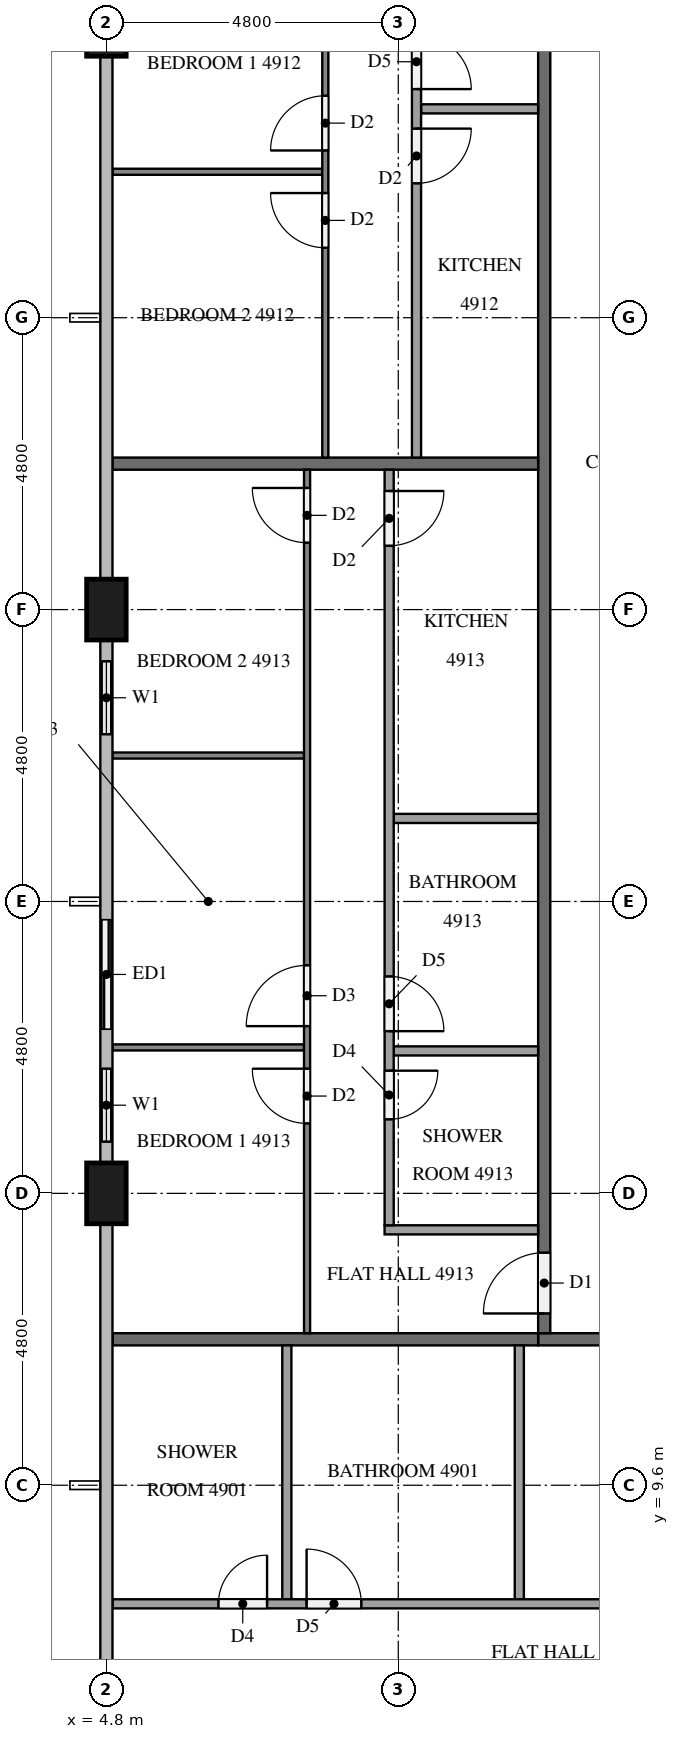
"""IFC4 building model, lengths in metres.
Left out: names, types, materials, properties, quantities, classifications, styles, units other than length and angle.
Written with IfcOpenShell. Run it as: python <this file> out.ifc"""

import sys

from ifc_helpers import new_model, si_unit, direction, frame, frame_2d, origin, origin_2d, place, context, subcontext, project, spatial, rectangle, extrude, element, fill, save


model = new_model("IFC4")
c1 = context("Model", 3, precision=1e-05, world=origin(), true_north=direction((0.0, 1.0)))
c2 = subcontext(c1, "Body", "Model", "MODEL_VIEW")
j1 = project(units=[si_unit("LENGTHUNIT", "METRE"), si_unit("PLANEANGLEUNIT", "RADIAN")], contexts=[c1])
p1 = place(None, origin())
s1 = spatial("IfcSite", under=j1, at=p1, CompositionType="ELEMENT")
p2 = place(p1, origin())
s2 = spatial("IfcBuilding", under=s1, at=p2, CompositionType="ELEMENT")
p3 = place(p2, frame((0.0, 0.0, 189.4)))
s3 = spatial("IfcBuildingStorey", under=s2, at=p3, CompositionType="ELEMENT", Elevation=189.4)
for number, where, z_axis, x_axis in (
    (1, (4.8, 33.6, 0.0), (0.0, 0.0, 1.0), (0.0, 1.0, 0.0)),
    (2, (4.8, 24.0, 0.0), (0.0, 0.0, 1.0), (0.0, 1.0, 0.0)),
    (3, (4.8, 14.4, 0.0), (0.0, 0.0, 1.0), (0.0, 1.0, 0.0)),
):
    element("IfcColumn", number, at=place(p3, frame(where, z_axis=z_axis, x_axis=x_axis)), inside=s3, PredefinedType="COLUMN", context=c2, shape_type="SweptSolid", body=[
        extrude(rectangle(XDim=1.0, YDim=0.65, at=origin_2d()), origin(), (0.0, 0.0, 1.0), 3.2),
    ])
p4 = place(p3, frame((4.8, 23.5, 0.0), z_axis=(0.0, 0.0, 1.0), x_axis=(0.0, -1.0, 0.0)))
e4 = element("IfcWall", 4, at=p4, inside=s3, PredefinedType="SOLIDWALL", context=c2, shape_type="SweptSolid", body=[
    extrude(rectangle(XDim=1.9, YDim=0.15, at=frame_2d((0.95, 0.0))), origin(), (0.0, 0.0, 1.0), 3.2),
])
p5 = place(p4, frame((0.35, 0.0, 0.9)))
e5 = element("IfcOpeningElement", 5, at=p5, cuts=e4, PredefinedType="OPENING", context=c2, shape_type="SweptSolid", body=[
    extrude(rectangle(XDim=1.2, YDim=1.4, at=frame_2d((0.6, 0.7))), frame((0.0, 0.085, 0.0), z_axis=(0.0, -1.0, 0.0), x_axis=(1.0, 0.0, 0.0)), (0.0, 0.0, 1.0), 0.17),
])
p6 = place(p3, frame((4.8, 19.2, 0.0), z_axis=(0.0, 0.0, 1.0), x_axis=(0.0, -1.0, 0.0)))
e6 = element("IfcWall", 6, at=p6, inside=s3, PredefinedType="SOLIDWALL", context=c2, shape_type="SweptSolid", body=[
    extrude(rectangle(XDim=4.3, YDim=0.15, at=frame_2d((2.15, 0.0))), origin(), (0.0, 0.0, 1.0), 3.2),
])
p7 = place(p6, frame((0.3, 0.0, 0.0)))
e7 = element("IfcOpeningElement", 7, at=p7, cuts=e6, PredefinedType="OPENING", context=c2, shape_type="SweptSolid", body=[
    extrude(rectangle(XDim=1.8, YDim=2.4, at=frame_2d((0.9, 1.2))), frame((0.0, 0.085, 0.0), z_axis=(0.0, -1.0, 0.0), x_axis=(1.0, 0.0, 0.0)), (0.0, 0.0, 1.0), 0.17),
])
p8 = place(p6, frame((2.75, 0.0, 0.9)))
e8 = element("IfcOpeningElement", 8, at=p8, cuts=e6, PredefinedType="OPENING", context=c2, shape_type="SweptSolid", body=[
    extrude(rectangle(XDim=1.2, YDim=1.4, at=frame_2d((0.6, 0.7))), frame((0.0, 0.085, 0.0), z_axis=(0.0, -1.0, 0.0), x_axis=(1.0, 0.0, 0.0)), (0.0, 0.0, 1.0), 0.17),
])
p9 = place(p3, frame((50.5, 12.0, 0.0), z_axis=(0.0, 0.0, 1.0), x_axis=(-1.0, 0.0, 0.0)))
e9 = element("IfcWall", 9, at=p9, inside=s3, PredefinedType="PARTITIONING", context=c2, shape_type="SweptSolid", body=[
    extrude(rectangle(XDim=38.6, YDim=0.2, at=frame_2d((19.3, 0.0))), origin(), (0.0, 0.0, 1.0), 3.2),
])
p10 = place(p9, frame((31.725, 0.0, 0.0)))
e10 = element("IfcOpeningElement", 10, at=p10, cuts=e9, PredefinedType="OPENING", context=c2, shape_type="SweptSolid", body=[
    extrude(rectangle(XDim=1.0, YDim=2.1, at=frame_2d((0.5, 1.05))), frame((0.0, 0.11, 0.0), z_axis=(0.0, -1.0, 0.0), x_axis=(1.0, 0.0, 0.0)), (0.0, 0.0, 1.0), 0.22),
])
p11 = place(p9, frame((19.725, 0.0, 0.0)))
e11 = element("IfcOpeningElement", 11, at=p11, cuts=e9, PredefinedType="OPENING", context=c2, shape_type="SweptSolid", body=[
    extrude(rectangle(XDim=1.0, YDim=2.1, at=frame_2d((0.5, 1.05))), frame((0.0, 0.11, 0.0), z_axis=(0.0, -1.0, 0.0), x_axis=(1.0, 0.0, 0.0)), (0.0, 0.0, 1.0), 0.22),
])
p12 = place(p9, frame((17.875, 0.0, 0.0)))
e12 = element("IfcOpeningElement", 12, at=p12, cuts=e9, PredefinedType="OPENING", context=c2, shape_type="SweptSolid", body=[
    extrude(rectangle(XDim=1.0, YDim=2.1, at=frame_2d((0.5, 1.05))), frame((0.0, 0.11, 0.0), z_axis=(0.0, -1.0, 0.0), x_axis=(1.0, 0.0, 0.0)), (0.0, 0.0, 1.0), 0.22),
])
p13 = place(p9, frame((3.475, 0.0, 0.0)))
e13 = element("IfcOpeningElement", 13, at=p13, cuts=e9, PredefinedType="OPENING", context=c2, shape_type="SweptSolid", body=[
    extrude(rectangle(XDim=1.0, YDim=2.1, at=frame_2d((0.5, 1.05))), frame((0.0, 0.11, 0.0), z_axis=(0.0, -1.0, 0.0), x_axis=(1.0, 0.0, 0.0)), (0.0, 0.0, 1.0), 0.22),
])
p14 = place(p3, frame((12.0, 12.1, 0.0), z_axis=(0.0, 0.0, 1.0), x_axis=(0.0, 1.0, 0.0)))
e14 = element("IfcWall", 14, at=p14, inside=s3, PredefinedType="PARTITIONING", context=c2, shape_type="SweptSolid", body=[
    extrude(rectangle(XDim=28.6, YDim=0.2, at=frame_2d((14.3, 0.0))), origin(), (0.0, 0.0, 1.0), 3.2),
])
p15 = place(p14, frame((27.275, 0.0, 0.0)))
e15 = element("IfcOpeningElement", 15, at=p15, cuts=e14, PredefinedType="OPENING", context=c2, shape_type="SweptSolid", body=[
    extrude(rectangle(XDim=1.0, YDim=2.1, at=frame_2d((0.5, 1.05))), frame((0.0, 0.11, 0.0), z_axis=(0.0, -1.0, 0.0), x_axis=(1.0, 0.0, 0.0)), (0.0, 0.0, 1.0), 0.22),
])
p16 = place(p14, frame((0.325, 0.0, 0.0)))
e16 = element("IfcOpeningElement", 16, at=p16, cuts=e14, PredefinedType="OPENING", context=c2, shape_type="SweptSolid", body=[
    extrude(rectangle(XDim=1.0, YDim=2.1, at=frame_2d((0.5, 1.05))), frame((0.0, 0.11, 0.0), z_axis=(0.0, -1.0, 0.0), x_axis=(1.0, 0.0, 0.0)), (0.0, 0.0, 1.0), 0.22),
])
for number, where, z_axis, x_axis in (
    (17, (4.9, 12.0, 0.0), (0.0, 0.0, 1.0), (1.0, 0.0, 0.0)),
    (18, (4.9, 26.4, 0.0), (0.0, 0.0, 1.0), (1.0, 0.0, 0.0)),
):
    element("IfcWall", number, at=place(p3, frame(where, z_axis=z_axis, x_axis=x_axis)), inside=s3, PredefinedType="PARTITIONING", context=c2, shape_type="SweptSolid", body=[
        extrude(rectangle(XDim=7.0, YDim=0.2, at=frame_2d((3.5, 0.0))), origin(), (0.0, 0.0, 1.0), 3.2),
    ])
for number, where, z_axis, x_axis in (
    (19, (11.59, 11.9, 0.0), (0.0, 0.0, 1.0), (0.0, -1.0, 0.0)),
    (20, (7.767, 11.9, 0.0), (0.0, 0.0, 1.0), (0.0, -1.0, 0.0)),
):
    element("IfcWall", number, at=place(p3, frame(where, z_axis=z_axis, x_axis=x_axis)), inside=s3, PredefinedType="PARTITIONING", context=c2, shape_type="SweptSolid", body=[
        extrude(rectangle(XDim=4.175, YDim=0.15, at=frame_2d((2.087, 0.0))), origin(), (0.0, 0.0, 1.0), 3.2),
    ])
p17 = place(p3, frame((4.9, 7.65, 0.0), z_axis=(0.0, 0.0, 1.0), x_axis=(1.0, 0.0, 0.0)))
e21 = element("IfcWall", 21, at=p17, inside=s3, PredefinedType="PARTITIONING", context=c2, shape_type="SweptSolid", body=[
    extrude(rectangle(XDim=12.425, YDim=0.15, at=frame_2d((6.212, 0.0))), origin(), (0.0, 0.0, 1.0), 3.2),
])
p18 = place(p17, frame((11.225, 0.0, 0.0)))
e22 = element("IfcOpeningElement", 22, at=p18, cuts=e21, PredefinedType="OPENING", context=c2, shape_type="SweptSolid", body=[
    extrude(rectangle(XDim=0.9, YDim=2.1, at=frame_2d((0.45, 1.05))), frame((0.0, 0.085, 0.0), z_axis=(0.0, -1.0, 0.0), x_axis=(1.0, 0.0, 0.0)), (0.0, 0.0, 1.0), 0.17),
])
p19 = place(p17, frame((3.192, 0.0, 0.0)))
e23 = element("IfcOpeningElement", 23, at=p19, cuts=e21, PredefinedType="OPENING", context=c2, shape_type="SweptSolid", body=[
    extrude(rectangle(XDim=0.9, YDim=2.1, at=frame_2d((0.45, 1.05))), frame((0.0, 0.085, 0.0), z_axis=(0.0, -1.0, 0.0), x_axis=(1.0, 0.0, 0.0)), (0.0, 0.0, 1.0), 0.17),
])
p20 = place(p17, frame((1.742, 0.0, 0.0)))
e24 = element("IfcOpeningElement", 24, at=p20, cuts=e21, PredefinedType="OPENING", context=c2, shape_type="SweptSolid", body=[
    extrude(rectangle(XDim=0.8, YDim=2.1, at=frame_2d((0.4, 1.05))), frame((0.0, 0.085, 0.0), z_axis=(0.0, -1.0, 0.0), x_axis=(1.0, 0.0, 0.0)), (0.0, 0.0, 1.0), 0.17),
])
p21 = place(p3, frame((8.35, 31.2, 0.0), z_axis=(0.0, 0.0, 1.0), x_axis=(-1.0, 0.0, 0.0)))
e25 = element("IfcWall", 25, at=p21, inside=s3, PredefinedType="PARTITIONING", context=c2, shape_type="SweptSolid", body=[
    extrude(rectangle(XDim=3.45, YDim=0.1, at=frame_2d((1.725, 0.0))), origin(), (0.0, 0.0, 1.0), 3.2),
])
p22 = place(p3, frame((8.4, 26.5, 0.0), z_axis=(0.0, 0.0, 1.0), x_axis=(0.0, 1.0, 0.0)))
e26 = element("IfcWall", 26, at=p22, inside=s3, PredefinedType="PARTITIONING", context=c2, shape_type="SweptSolid", body=[
    extrude(rectangle(XDim=14.2, YDim=0.1, at=frame_2d((7.1, 0.0))), origin(), (0.0, 0.0, 1.0), 3.2),
])
p23 = place(p22, frame((12.9, 0.0, 0.0)))
e27 = element("IfcOpeningElement", 27, at=p23, cuts=e26, PredefinedType="OPENING", context=c2, shape_type="SweptSolid", body=[
    extrude(rectangle(XDim=1.0, YDim=2.1, at=frame_2d((0.5, 1.05))), frame((0.0, 0.06, 0.0), z_axis=(0.0, -1.0, 0.0), x_axis=(1.0, 0.0, 0.0)), (0.0, 0.0, 1.0), 0.12),
])
p24 = place(p22, frame((5.05, 0.0, 0.0)))
e28 = element("IfcOpeningElement", 28, at=p24, cuts=e26, PredefinedType="OPENING", context=c2, shape_type="SweptSolid", body=[
    extrude(rectangle(XDim=0.9, YDim=2.1, at=frame_2d((0.45, 1.05))), frame((0.0, 0.06, 0.0), z_axis=(0.0, -1.0, 0.0), x_axis=(1.0, 0.0, 0.0)), (0.0, 0.0, 1.0), 0.12),
])
p25 = place(p22, frame((3.45, 0.0, 0.0)))
e29 = element("IfcOpeningElement", 29, at=p25, cuts=e26, PredefinedType="OPENING", context=c2, shape_type="SweptSolid", body=[
    extrude(rectangle(XDim=0.9, YDim=2.1, at=frame_2d((0.45, 1.05))), frame((0.0, 0.06, 0.0), z_axis=(0.0, -1.0, 0.0), x_axis=(1.0, 0.0, 0.0)), (0.0, 0.0, 1.0), 0.12),
])
p26 = place(p3, frame((11.9, 32.235, 0.0), z_axis=(0.0, 0.0, 1.0), x_axis=(-1.0, 0.0, 0.0)))
e30 = element("IfcWall", 30, at=p26, inside=s3, PredefinedType="PARTITIONING", context=c2, shape_type="SweptSolid", body=[
    extrude(rectangle(XDim=1.925, YDim=0.15, at=frame_2d((0.962, 0.0))), origin(), (0.0, 0.0, 1.0), 3.2),
])
p27 = place(p3, frame((9.9, 38.925, 0.0), z_axis=(0.0, 0.0, 1.0), x_axis=(0.0, -1.0, 0.0)))
e31 = element("IfcWall", 31, at=p27, inside=s3, PredefinedType="PARTITIONING", context=c2, shape_type="SweptSolid", body=[
    extrude(rectangle(XDim=12.425, YDim=0.15, at=frame_2d((6.212, 0.0))), origin(), (0.0, 0.0, 1.0), 3.2),
])
p28 = place(p27, frame((0.3, 0.0, 0.0)))
e32 = element("IfcOpeningElement", 32, at=p28, cuts=e31, PredefinedType="OPENING", context=c2, shape_type="SweptSolid", body=[
    extrude(rectangle(XDim=0.8, YDim=2.1, at=frame_2d((0.4, 1.05))), frame((0.0, 0.085, 0.0), z_axis=(0.0, -1.0, 0.0), x_axis=(1.0, 0.0, 0.0)), (0.0, 0.0, 1.0), 0.17),
])
p29 = place(p27, frame((5.465, 0.0, 0.0)))
e33 = element("IfcOpeningElement", 33, at=p29, cuts=e31, PredefinedType="OPENING", context=c2, shape_type="SweptSolid", body=[
    extrude(rectangle(XDim=0.9, YDim=2.1, at=frame_2d((0.45, 1.05))), frame((0.0, 0.085, 0.0), z_axis=(0.0, -1.0, 0.0), x_axis=(1.0, 0.0, 0.0)), (0.0, 0.0, 1.0), 0.17),
])
p30 = place(p27, frame((7.015, 0.0, 0.0)))
e34 = element("IfcOpeningElement", 34, at=p30, cuts=e31, PredefinedType="OPENING", context=c2, shape_type="SweptSolid", body=[
    extrude(rectangle(XDim=0.9, YDim=2.1, at=frame_2d((0.45, 1.05))), frame((0.0, 0.085, 0.0), z_axis=(0.0, -1.0, 0.0), x_axis=(1.0, 0.0, 0.0)), (0.0, 0.0, 1.0), 0.17),
])
for number, where, z_axis, x_axis in (
    (35, (8.05, 16.8, 0.0), (0.0, 0.0, 1.0), (-1.0, 0.0, 0.0)),
    (36, (8.05, 21.6, 0.0), (0.0, 0.0, 1.0), (-1.0, 0.0, 0.0)),
):
    element("IfcWall", number, at=place(p3, frame(where, z_axis=z_axis, x_axis=x_axis)), inside=s3, PredefinedType="PARTITIONING", context=c2, shape_type="SweptSolid", body=[
        extrude(rectangle(XDim=3.15, YDim=0.1, at=frame_2d((1.575, 0.0))), origin(), (0.0, 0.0, 1.0), 3.2),
    ])
p31 = place(p3, frame((8.1, 12.1, 0.0), z_axis=(0.0, 0.0, 1.0), x_axis=(0.0, 1.0, 0.0)))
e37 = element("IfcWall", 37, at=p31, inside=s3, PredefinedType="PARTITIONING", context=c2, shape_type="SweptSolid", body=[
    extrude(rectangle(XDim=14.2, YDim=0.1, at=frame_2d((7.1, 0.0))), origin(), (0.0, 0.0, 1.0), 3.2),
])
p32 = place(p31, frame((3.45, 0.0, 0.0)))
e38 = element("IfcOpeningElement", 38, at=p32, cuts=e37, PredefinedType="OPENING", context=c2, shape_type="SweptSolid", body=[
    extrude(rectangle(XDim=0.9, YDim=2.1, at=frame_2d((0.45, 1.05))), frame((0.0, 0.06, 0.0), z_axis=(0.0, -1.0, 0.0), x_axis=(1.0, 0.0, 0.0)), (0.0, 0.0, 1.0), 0.12),
])
p33 = place(p31, frame((5.05, 0.0, 0.0)))
e39 = element("IfcOpeningElement", 39, at=p33, cuts=e37, PredefinedType="OPENING", context=c2, shape_type="SweptSolid", body=[
    extrude(rectangle(XDim=1.0, YDim=2.1, at=frame_2d((0.5, 1.05))), frame((0.0, 0.06, 0.0), z_axis=(0.0, -1.0, 0.0), x_axis=(1.0, 0.0, 0.0)), (0.0, 0.0, 1.0), 0.12),
])
p34 = place(p31, frame((13.0, 0.0, 0.0)))
e40 = element("IfcOpeningElement", 40, at=p34, cuts=e37, PredefinedType="OPENING", context=c2, shape_type="SweptSolid", body=[
    extrude(rectangle(XDim=0.9, YDim=2.1, at=frame_2d((0.45, 1.05))), frame((0.0, 0.06, 0.0), z_axis=(0.0, -1.0, 0.0), x_axis=(1.0, 0.0, 0.0)), (0.0, 0.0, 1.0), 0.12),
])
for number, where, z_axis, x_axis in (
    (41, (11.9, 16.742, 0.0), (0.0, 0.0, 1.0), (-1.0, 0.0, 0.0)),
    (42, (11.9, 20.565, 0.0), (0.0, 0.0, 1.0), (-1.0, 0.0, 0.0)),
):
    element("IfcWall", number, at=place(p3, frame(where, z_axis=z_axis, x_axis=x_axis)), inside=s3, PredefinedType="PARTITIONING", context=c2, shape_type="SweptSolid", body=[
        extrude(rectangle(XDim=2.375, YDim=0.15, at=frame_2d((1.188, 0.0))), origin(), (0.0, 0.0, 1.0), 3.2),
    ])
p35 = place(p3, frame((11.9, 13.8, 0.0), z_axis=(0.0, 0.0, 1.0), x_axis=(-1.0, 0.0, 0.0)))
e43 = element("IfcWall", 43, at=p35, inside=s3, PredefinedType="PARTITIONING", context=c2, shape_type="SweptSolid", body=[
    extrude(rectangle(XDim=2.525, YDim=0.15, at=frame_2d((1.262, 0.0))), origin(), (0.0, 0.0, 1.0), 3.2),
])
p36 = place(p3, frame((9.45, 26.3, 0.0), z_axis=(0.0, 0.0, 1.0), x_axis=(0.0, -1.0, 0.0)))
e44 = element("IfcWall", 44, at=p36, inside=s3, PredefinedType="PARTITIONING", context=c2, shape_type="SweptSolid", body=[
    extrude(rectangle(XDim=12.425, YDim=0.15, at=frame_2d((6.212, 0.0))), origin(), (0.0, 0.0, 1.0), 3.2),
])
p37 = place(p36, frame((9.883, 0.0, 0.0)))
e45 = element("IfcOpeningElement", 45, at=p37, cuts=e44, PredefinedType="OPENING", context=c2, shape_type="SweptSolid", body=[
    extrude(rectangle(XDim=0.8, YDim=2.1, at=frame_2d((0.4, 1.05))), frame((0.0, 0.085, 0.0), z_axis=(0.0, -1.0, 0.0), x_axis=(1.0, 0.0, 0.0)), (0.0, 0.0, 1.0), 0.17),
])
p38 = place(p36, frame((8.333, 0.0, 0.0)))
e46 = element("IfcOpeningElement", 46, at=p38, cuts=e44, PredefinedType="OPENING", context=c2, shape_type="SweptSolid", body=[
    extrude(rectangle(XDim=0.9, YDim=2.1, at=frame_2d((0.45, 1.05))), frame((0.0, 0.085, 0.0), z_axis=(0.0, -1.0, 0.0), x_axis=(1.0, 0.0, 0.0)), (0.0, 0.0, 1.0), 0.17),
])
p39 = place(p36, frame((0.35, 0.0, 0.0)))
e47 = element("IfcOpeningElement", 47, at=p39, cuts=e44, PredefinedType="OPENING", context=c2, shape_type="SweptSolid", body=[
    extrude(rectangle(XDim=0.9, YDim=2.1, at=frame_2d((0.45, 1.05))), frame((0.0, 0.085, 0.0), z_axis=(0.0, -1.0, 0.0), x_axis=(1.0, 0.0, 0.0)), (0.0, 0.0, 1.0), 0.17),
])
p40 = place(p5, origin())
e48 = element("IfcWindow", 48, at=p40, inside=s3, PartitioningType="SINGLE_PANEL", PredefinedType="WINDOW", context=c2, shape_type="SweptSolid", body=[
    extrude(rectangle(XDim=1.2, YDim=1.4, at=frame_2d((0.6, 0.7))), frame((0.0, 0.03, 0.0), z_axis=(0.0, -1.0, 0.0), x_axis=(1.0, 0.0, 0.0)), (0.0, 0.0, 1.0), 0.06),
])
fill(e5, e48)
p41 = place(p7, origin())
e49 = element("IfcDoor", 49, at=p41, inside=s3, OperationType="SLIDING_TO_LEFT", PredefinedType="DOOR", context=c2, shape_type="SweptSolid", body=[
    extrude(rectangle(XDim=1.8, YDim=2.4, at=frame_2d((0.9, 1.2))), frame((0.0, 0.025, 0.0), z_axis=(0.0, -1.0, 0.0), x_axis=(1.0, 0.0, 0.0)), (0.0, 0.0, 1.0), 0.05),
])
fill(e7, e49)
p42 = place(p8, origin())
e50 = element("IfcWindow", 50, at=p42, inside=s3, PartitioningType="SINGLE_PANEL", PredefinedType="WINDOW", context=c2, shape_type="SweptSolid", body=[
    extrude(rectangle(XDim=1.2, YDim=1.4, at=frame_2d((0.6, 0.7))), frame((0.0, 0.03, 0.0), z_axis=(0.0, -1.0, 0.0), x_axis=(1.0, 0.0, 0.0)), (0.0, 0.0, 1.0), 0.06),
])
fill(e8, e50)
p43 = place(p16, origin())
e51 = element("IfcDoor", 51, at=p43, inside=s3, OperationType="SINGLE_SWING_LEFT", PredefinedType="DOOR", context=c2, shape_type="SweptSolid", body=[
    extrude(rectangle(XDim=1.0, YDim=2.1, at=frame_2d((0.5, 1.05))), frame((0.0, 0.025, 0.0), z_axis=(0.0, -1.0, 0.0), x_axis=(1.0, 0.0, 0.0)), (0.0, 0.0, 1.0), 0.05),
])
fill(e16, e51)
p44 = place(p19, origin())
e52 = element("IfcDoor", 52, at=p44, inside=s3, OperationType="SINGLE_SWING_LEFT", PredefinedType="DOOR", context=c2, shape_type="SweptSolid", body=[
    extrude(rectangle(XDim=0.9, YDim=2.1, at=frame_2d((0.45, 1.05))), frame((0.0, 0.025, 0.0), z_axis=(0.0, -1.0, 0.0), x_axis=(1.0, 0.0, 0.0)), (0.0, 0.0, 1.0), 0.05),
])
fill(e23, e52)
p45 = place(p20, origin())
e53 = element("IfcDoor", 53, at=p45, inside=s3, OperationType="SINGLE_SWING_RIGHT", PredefinedType="DOOR", context=c2, shape_type="SweptSolid", body=[
    extrude(rectangle(XDim=0.8, YDim=2.1, at=frame_2d((0.4, 1.05))), frame((0.0, 0.025, 0.0), z_axis=(0.0, -1.0, 0.0), x_axis=(1.0, 0.0, 0.0)), (0.0, 0.0, 1.0), 0.05),
])
fill(e24, e53)
p46 = place(p24, origin())
e54 = element("IfcDoor", 54, at=p46, inside=s3, OperationType="SINGLE_SWING_LEFT", PredefinedType="DOOR", context=c2, shape_type="SweptSolid", body=[
    extrude(rectangle(XDim=0.9, YDim=2.1, at=frame_2d((0.45, 1.05))), frame((0.0, 0.025, 0.0), z_axis=(0.0, -1.0, 0.0), x_axis=(1.0, 0.0, 0.0)), (0.0, 0.0, 1.0), 0.05),
])
fill(e28, e54)
p47 = place(p25, origin())
e55 = element("IfcDoor", 55, at=p47, inside=s3, OperationType="SINGLE_SWING_RIGHT", PredefinedType="DOOR", context=c2, shape_type="SweptSolid", body=[
    extrude(rectangle(XDim=0.9, YDim=2.1, at=frame_2d((0.45, 1.05))), frame((0.0, 0.025, 0.0), z_axis=(0.0, -1.0, 0.0), x_axis=(1.0, 0.0, 0.0)), (0.0, 0.0, 1.0), 0.05),
])
fill(e29, e55)
p48 = place(p29, origin())
e56 = element("IfcDoor", 56, at=p48, inside=s3, OperationType="SINGLE_SWING_RIGHT", PredefinedType="DOOR", context=c2, shape_type="SweptSolid", body=[
    extrude(rectangle(XDim=0.9, YDim=2.1, at=frame_2d((0.45, 1.05))), frame((0.0, 0.025, 0.0), z_axis=(0.0, -1.0, 0.0), x_axis=(1.0, 0.0, 0.0)), (0.0, 0.0, 1.0), 0.05),
])
fill(e33, e56)
p49 = place(p30, origin())
e57 = element("IfcDoor", 57, at=p49, inside=s3, OperationType="SINGLE_SWING_LEFT", PredefinedType="DOOR", context=c2, shape_type="SweptSolid", body=[
    extrude(rectangle(XDim=0.9, YDim=2.1, at=frame_2d((0.45, 1.05))), frame((0.0, 0.025, 0.0), z_axis=(0.0, -1.0, 0.0), x_axis=(1.0, 0.0, 0.0)), (0.0, 0.0, 1.0), 0.05),
])
fill(e34, e57)
p50 = place(p32, origin())
e58 = element("IfcDoor", 58, at=p50, inside=s3, OperationType="SINGLE_SWING_RIGHT", PredefinedType="DOOR", context=c2, shape_type="SweptSolid", body=[
    extrude(rectangle(XDim=0.9, YDim=2.1, at=frame_2d((0.45, 1.05))), frame((0.0, 0.025, 0.0), z_axis=(0.0, -1.0, 0.0), x_axis=(1.0, 0.0, 0.0)), (0.0, 0.0, 1.0), 0.05),
])
fill(e38, e58)
p51 = place(p33, origin())
e59 = element("IfcDoor", 59, at=p51, inside=s3, OperationType="SINGLE_SWING_LEFT", PredefinedType="DOOR", context=c2, shape_type="SweptSolid", body=[
    extrude(rectangle(XDim=1.0, YDim=2.1, at=frame_2d((0.5, 1.05))), frame((0.0, 0.025, 0.0), z_axis=(0.0, -1.0, 0.0), x_axis=(1.0, 0.0, 0.0)), (0.0, 0.0, 1.0), 0.05),
])
fill(e39, e59)
p52 = place(p34, origin())
e60 = element("IfcDoor", 60, at=p52, inside=s3, OperationType="SINGLE_SWING_RIGHT", PredefinedType="DOOR", context=c2, shape_type="SweptSolid", body=[
    extrude(rectangle(XDim=0.9, YDim=2.1, at=frame_2d((0.45, 1.05))), frame((0.0, 0.025, 0.0), z_axis=(0.0, -1.0, 0.0), x_axis=(1.0, 0.0, 0.0)), (0.0, 0.0, 1.0), 0.05),
])
fill(e40, e60)
p53 = place(p37, origin())
e61 = element("IfcDoor", 61, at=p53, inside=s3, OperationType="SINGLE_SWING_LEFT", PredefinedType="DOOR", context=c2, shape_type="SweptSolid", body=[
    extrude(rectangle(XDim=0.8, YDim=2.1, at=frame_2d((0.4, 1.05))), frame((0.0, 0.025, 0.0), z_axis=(0.0, -1.0, 0.0), x_axis=(1.0, 0.0, 0.0)), (0.0, 0.0, 1.0), 0.05),
])
fill(e45, e61)
p54 = place(p38, origin())
e62 = element("IfcDoor", 62, at=p54, inside=s3, OperationType="SINGLE_SWING_RIGHT", PredefinedType="DOOR", context=c2, shape_type="SweptSolid", body=[
    extrude(rectangle(XDim=0.9, YDim=2.1, at=frame_2d((0.45, 1.05))), frame((0.0, 0.025, 0.0), z_axis=(0.0, -1.0, 0.0), x_axis=(1.0, 0.0, 0.0)), (0.0, 0.0, 1.0), 0.05),
])
fill(e46, e62)
p55 = place(p39, origin())
e63 = element("IfcDoor", 63, at=p55, inside=s3, OperationType="SINGLE_SWING_LEFT", PredefinedType="DOOR", context=c2, shape_type="SweptSolid", body=[
    extrude(rectangle(XDim=0.9, YDim=2.1, at=frame_2d((0.45, 1.05))), frame((0.0, 0.025, 0.0), z_axis=(0.0, -1.0, 0.0), x_axis=(1.0, 0.0, 0.0)), (0.0, 0.0, 1.0), 0.05),
])
fill(e47, e63)
save(model, sys.argv[1])
